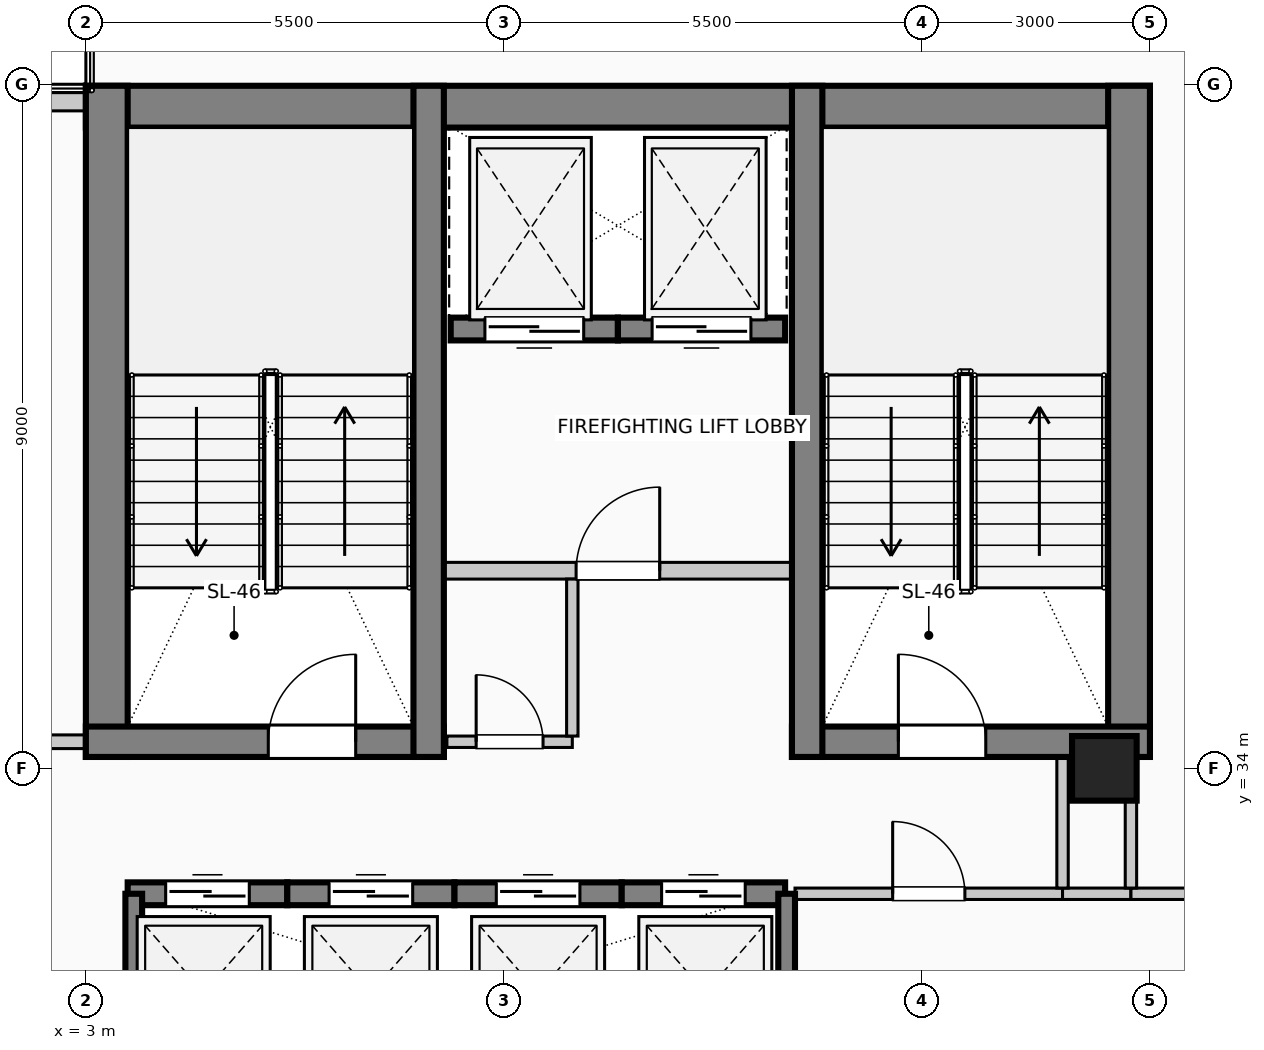
"""IFC4 building model, lengths in metres.
Left out: names, types, materials, properties, quantities, classifications, styles, units other than length and angle.
Written with IfcOpenShell. Run it as: python <this file> out.ifc"""

import sys

from ifc_helpers import new_model, si_unit, direction, frame, frame_2d, origin, origin_2d, place, context, subcontext, project, spatial, rectangle, circle, extrude, element, fill, save


model = new_model("IFC4")
c1 = context("Model", 3, precision=1e-05, world=origin(), true_north=direction((0.0, 1.0)))
c2 = subcontext(c1, "Body", "Model", "MODEL_VIEW")
j1 = project(units=[si_unit("LENGTHUNIT", "METRE"), si_unit("PLANEANGLEUNIT", "RADIAN")], contexts=[c1])
p1 = place(None, origin())
s1 = spatial("IfcSite", under=j1, at=p1, CompositionType="ELEMENT")
p2 = place(p1, origin())
s2 = spatial("IfcBuilding", under=s1, at=p2, CompositionType="ELEMENT")
p3 = place(p2, frame((0.0, 0.0, 285.0)))
s3 = spatial("IfcBuildingStorey", under=s2, at=p3, CompositionType="ELEMENT", Elevation=285.0)
p4 = place(p3, frame((3.0, 42.705, 0.0), z_axis=(0.0, 0.0, 1.0), x_axis=(1.0, 0.0, 0.0)))
e1 = element("IfcWall", 1, at=p4, inside=s3, PredefinedType="SHEAR", context=c2, shape_type="SweptSolid", body=[
    extrude(rectangle(XDim=14.0, YDim=0.55, at=frame_2d((7.0, 0.0))), origin(), (0.0, 0.0, 1.0), 4.0),
])
for number, where, z_axis, x_axis in (
    (2, (3.275, 34.15, 0.0), (0.0, 0.0, 1.0), (0.0, 1.0, 0.0)),
    (3, (16.725, 34.15, 0.0), (0.0, 0.0, 1.0), (0.0, 1.0, 0.0)),
):
    element("IfcWall", number, at=place(p3, frame(where, z_axis=z_axis, x_axis=x_axis)), inside=s3, PredefinedType="SHEAR", context=c2, shape_type="SweptSolid", body=[
        extrude(rectangle(XDim=8.83, YDim=0.55, at=frame_2d((4.415, 0.0))), origin(), (0.0, 0.0, 1.0), 4.0),
    ])
p5 = place(p3, frame((3.0, 34.35, 0.0), z_axis=(0.0, 0.0, 1.0), x_axis=(1.0, 0.0, 0.0)))
e4 = element("IfcWall", 4, at=p5, inside=s3, PredefinedType="SHEAR", context=c2, shape_type="SweptSolid", body=[
    extrude(rectangle(XDim=4.71, YDim=0.4, at=frame_2d((2.355, 0.0))), origin(), (0.0, 0.0, 1.0), 4.0),
])
p6 = place(p5, frame((2.4, 0.0, 0.0)))
e5 = element("IfcOpeningElement", 5, at=p6, cuts=e4, PredefinedType="OPENING", context=c2, shape_type="SweptSolid", body=[
    extrude(rectangle(XDim=1.15, YDim=2.2, at=frame_2d((0.575, 1.1))), frame((0.0, 0.21, 0.0), z_axis=(0.0, -1.0, 0.0), x_axis=(1.0, 0.0, 0.0)), (0.0, 0.0, 1.0), 0.42),
])
p7 = place(p3, frame((12.29, 34.35, 0.0), z_axis=(0.0, 0.0, 1.0), x_axis=(1.0, 0.0, 0.0)))
e6 = element("IfcWall", 6, at=p7, inside=s3, PredefinedType="SHEAR", context=c2, shape_type="SweptSolid", body=[
    extrude(rectangle(XDim=4.71, YDim=0.4, at=frame_2d((2.355, 0.0))), origin(), (0.0, 0.0, 1.0), 4.0),
])
p8 = place(p7, frame((1.4, 0.0, 0.0)))
e7 = element("IfcOpeningElement", 7, at=p8, cuts=e6, PredefinedType="OPENING", context=c2, shape_type="SweptSolid", body=[
    extrude(rectangle(XDim=1.15, YDim=2.2, at=frame_2d((0.575, 1.1))), frame((0.0, 0.21, 0.0), z_axis=(0.0, -1.0, 0.0), x_axis=(1.0, 0.0, 0.0)), (0.0, 0.0, 1.0), 0.42),
])
for number, where, z_axis, x_axis in (
    (8, (7.51, 34.15, 0.0), (0.0, 0.0, 1.0), (0.0, 1.0, 0.0)),
    (9, (12.49, 34.15, 0.0), (0.0, 0.0, 1.0), (0.0, 1.0, 0.0)),
):
    element("IfcWall", number, at=place(p3, frame(where, z_axis=z_axis, x_axis=x_axis)), inside=s3, PredefinedType="SHEAR", context=c2, shape_type="SweptSolid", body=[
        extrude(rectangle(XDim=8.83, YDim=0.4, at=frame_2d((4.415, 0.0))), origin(), (0.0, 0.0, 1.0), 4.0),
    ])
p9 = place(p3, frame((16.4, 34.0, 0.0), z_axis=(0.0, 0.0, 1.0), x_axis=(1.0, 0.0, 0.0)))
e10 = element("IfcColumn", 10, at=p9, inside=s3, PredefinedType="COLUMN", context=c2, shape_type="SweptSolid", body=[
    extrude(circle(Radius=0.425, at=origin_2d()), origin(), (0.0, 0.0, 1.0), 4.0),
])
p10 = place(p3, frame((0.6, 42.77, 0.0), z_axis=(0.0, 0.0, 1.0), x_axis=(1.0, 0.0, 0.0)))
e11 = element("IfcWall", 11, at=p10, inside=s3, PredefinedType="SOLIDWALL", context=c2, shape_type="SweptSolid", body=[
    extrude(rectangle(XDim=2.395, YDim=0.24, at=frame_2d((1.198, 0.0))), origin(), (0.0, 0.0, 1.0), 3.775),
])
p11 = place(p3, frame((3.55, 32.35, 0.0), z_axis=(0.0, 0.0, 1.0), x_axis=(1.0, 0.0, 0.0)))
e12 = element("IfcWall", 12, at=p11, inside=s3, PredefinedType="SOLIDWALL", context=c2, shape_type="SweptSolid", body=[
    extrude(rectangle(XDim=2.1, YDim=0.3, at=frame_2d((1.05, 0.0))), origin(), (0.0, 0.0, 1.0), 4.0),
])
p12 = place(p11, frame((0.5, 0.0, 0.0)))
e13 = element("IfcOpeningElement", 13, at=p12, cuts=e12, PredefinedType="OPENING", context=c2, shape_type="SweptSolid", body=[
    extrude(rectangle(XDim=1.1, YDim=2.2, at=frame_2d((0.55, 1.1))), frame((0.0, 0.16, 0.0), z_axis=(0.0, -1.0, 0.0), x_axis=(1.0, 0.0, 0.0)), (0.0, 0.0, 1.0), 0.32),
])
p13 = place(p3, frame((5.65, 32.35, 0.0), z_axis=(0.0, 0.0, 1.0), x_axis=(1.0, 0.0, 0.0)))
e14 = element("IfcWall", 14, at=p13, inside=s3, PredefinedType="SOLIDWALL", context=c2, shape_type="SweptSolid", body=[
    extrude(rectangle(XDim=2.2, YDim=0.3, at=frame_2d((1.1, 0.0))), origin(), (0.0, 0.0, 1.0), 4.0),
])
p14 = place(p13, frame((0.55, 0.0, 0.0)))
e15 = element("IfcOpeningElement", 15, at=p14, cuts=e14, PredefinedType="OPENING", context=c2, shape_type="SweptSolid", body=[
    extrude(rectangle(XDim=1.1, YDim=2.2, at=frame_2d((0.55, 1.1))), frame((0.0, 0.16, 0.0), z_axis=(0.0, -1.0, 0.0), x_axis=(1.0, 0.0, 0.0)), (0.0, 0.0, 1.0), 0.32),
])
p15 = place(p3, frame((7.85, 32.35, 0.0), z_axis=(0.0, 0.0, 1.0), x_axis=(1.0, 0.0, 0.0)))
e16 = element("IfcWall", 16, at=p15, inside=s3, PredefinedType="SOLIDWALL", context=c2, shape_type="SweptSolid", body=[
    extrude(rectangle(XDim=2.2, YDim=0.3, at=frame_2d((1.1, 0.0))), origin(), (0.0, 0.0, 1.0), 4.0),
])
p16 = place(p15, frame((0.55, 0.0, 0.0)))
e17 = element("IfcOpeningElement", 17, at=p16, cuts=e16, PredefinedType="OPENING", context=c2, shape_type="SweptSolid", body=[
    extrude(rectangle(XDim=1.1, YDim=2.2, at=frame_2d((0.55, 1.1))), frame((0.0, 0.16, 0.0), z_axis=(0.0, -1.0, 0.0), x_axis=(1.0, 0.0, 0.0)), (0.0, 0.0, 1.0), 0.32),
])
p17 = place(p3, frame((10.05, 32.35, 0.0), z_axis=(0.0, 0.0, 1.0), x_axis=(1.0, 0.0, 0.0)))
e18 = element("IfcWall", 18, at=p17, inside=s3, PredefinedType="SOLIDWALL", context=c2, shape_type="SweptSolid", body=[
    extrude(rectangle(XDim=2.15, YDim=0.3, at=frame_2d((1.075, 0.0))), origin(), (0.0, 0.0, 1.0), 4.0),
])
p18 = place(p17, frame((0.525, 0.0, 0.0)))
e19 = element("IfcOpeningElement", 19, at=p18, cuts=e18, PredefinedType="OPENING", context=c2, shape_type="SweptSolid", body=[
    extrude(rectangle(XDim=1.1, YDim=2.2, at=frame_2d((0.55, 1.1))), frame((0.0, 0.16, 0.0), z_axis=(0.0, -1.0, 0.0), x_axis=(1.0, 0.0, 0.0)), (0.0, 0.0, 1.0), 0.32),
])
p19 = place(p3, frame((10.0, 39.78, 0.0), z_axis=(0.0, 0.0, 1.0), x_axis=(-1.0, 0.0, 0.0)))
e20 = element("IfcWall", 20, at=p19, inside=s3, PredefinedType="SOLIDWALL", context=c2, shape_type="SweptSolid", body=[
    extrude(rectangle(XDim=2.2, YDim=0.3, at=frame_2d((1.1, 0.0))), origin(), (0.0, 0.0, 1.0), 4.0),
])
p20 = place(p19, frame((0.45, 0.0, 0.0)))
e21 = element("IfcOpeningElement", 21, at=p20, cuts=e20, PredefinedType="OPENING", context=c2, shape_type="SweptSolid", body=[
    extrude(rectangle(XDim=1.3, YDim=2.25, at=frame_2d((0.65, 1.125))), frame((0.0, 0.16, 0.0), z_axis=(0.0, -1.0, 0.0), x_axis=(1.0, 0.0, 0.0)), (0.0, 0.0, 1.0), 0.32),
])
p21 = place(p3, frame((12.2, 39.78, 0.0), z_axis=(0.0, 0.0, 1.0), x_axis=(-1.0, 0.0, 0.0)))
e22 = element("IfcWall", 22, at=p21, inside=s3, PredefinedType="SOLIDWALL", context=c2, shape_type="SweptSolid", body=[
    extrude(rectangle(XDim=2.2, YDim=0.3, at=frame_2d((1.1, 0.0))), origin(), (0.0, 0.0, 1.0), 4.0),
])
p22 = place(p21, frame((0.45, 0.0, 0.0)))
e23 = element("IfcOpeningElement", 23, at=p22, cuts=e22, PredefinedType="OPENING", context=c2, shape_type="SweptSolid", body=[
    extrude(rectangle(XDim=1.3, YDim=2.25, at=frame_2d((0.65, 1.125))), frame((0.0, 0.16, 0.0), z_axis=(0.0, -1.0, 0.0), x_axis=(1.0, 0.0, 0.0)), (0.0, 0.0, 1.0), 0.32),
])
p23 = place(p3, frame((3.63, 26.8, 0.0), z_axis=(0.0, 0.0, 1.0), x_axis=(0.0, 1.0, 0.0)))
e24 = element("IfcWall", 24, at=p23, inside=s3, PredefinedType="SOLIDWALL", context=c2, shape_type="SweptSolid", body=[
    extrude(rectangle(XDim=5.55, YDim=0.22, at=frame_2d((2.775, 0.0))), origin(), (0.0, 0.0, 1.0), 4.0),
])
p24 = place(p3, frame((12.22, 29.75, 0.0), z_axis=(0.0, 0.0, 1.0), x_axis=(0.0, 1.0, 0.0)))
e25 = element("IfcWall", 25, at=p24, inside=s3, PredefinedType="SOLIDWALL", context=c2, shape_type="SweptSolid", body=[
    extrude(rectangle(XDim=2.6, YDim=0.22, at=frame_2d((1.3, 0.0))), origin(), (0.0, 0.0, 1.0), 4.0),
])
p25 = place(p3, frame((7.51, 36.6, 0.0), z_axis=(0.0, 0.0, 1.0), x_axis=(1.0, 0.0, 0.0)))
e26 = element("IfcWall", 26, at=p25, inside=s3, PredefinedType="PARTITIONING", context=c2, shape_type="SweptSolid", body=[
    extrude(rectangle(XDim=4.98, YDim=0.22, at=frame_2d((2.49, 0.0))), origin(), (0.0, 0.0, 1.0), 3.775),
])
p26 = place(p25, frame((1.94, 0.0, 0.0)))
e27 = element("IfcOpeningElement", 27, at=p26, cuts=e26, PredefinedType="OPENING", context=c2, shape_type="SweptSolid", body=[
    extrude(rectangle(XDim=1.1, YDim=2.2, at=frame_2d((0.55, 1.1))), frame((0.0, 0.12, 0.0), z_axis=(0.0, -1.0, 0.0), x_axis=(1.0, 0.0, 0.0)), (0.0, 0.0, 1.0), 0.24),
])
p27 = place(p3, frame((12.33, 32.35, 0.0), z_axis=(0.0, 0.0, 1.0), x_axis=(1.0, 0.0, 0.0)))
e28 = element("IfcWall", 28, at=p27, inside=s3, PredefinedType="PARTITIONING", context=c2, shape_type="SweptSolid", body=[
    extrude(rectangle(XDim=3.52, YDim=0.15, at=frame_2d((1.76, 0.0))), origin(), (0.0, 0.0, 1.0), 3.775),
])
p28 = place(p27, frame((1.285, 0.0, 0.0)))
e29 = element("IfcOpeningElement", 29, at=p28, cuts=e28, PredefinedType="OPENING", context=c2, shape_type="SweptSolid", body=[
    extrude(rectangle(XDim=0.95, YDim=2.15, at=frame_2d((0.475, 1.075))), frame((0.0, 0.085, 0.0), z_axis=(0.0, -1.0, 0.0), x_axis=(1.0, 0.0, 0.0)), (0.0, 0.0, 1.0), 0.17),
])
p29 = place(p3, frame((15.85, 32.35, 0.0), z_axis=(0.0, 0.0, 1.0), x_axis=(1.0, 0.0, 0.0)))
e30 = element("IfcWall", 30, at=p29, inside=s3, PredefinedType="PARTITIONING", context=c2, shape_type="SweptSolid", body=[
    extrude(rectangle(XDim=0.9, YDim=0.15, at=frame_2d((0.45, 0.0))), origin(), (0.0, 0.0, 1.0), 3.775),
])
p30 = place(p3, frame((16.75, 32.35, 0.0), z_axis=(0.0, 0.0, 1.0), x_axis=(1.0, 0.0, 0.0)))
e31 = element("IfcWall", 31, at=p30, inside=s3, PredefinedType="PARTITIONING", context=c2, shape_type="SweptSolid", body=[
    extrude(rectangle(XDim=4.25, YDim=0.15, at=frame_2d((2.125, 0.0))), origin(), (0.0, 0.0, 1.0), 3.775),
])
p31 = place(p3, frame((1.075, 34.35, 0.0), z_axis=(0.0, 0.0, 1.0), x_axis=(1.0, 0.0, 0.0)))
e32 = element("IfcWall", 32, at=p31, inside=s3, PredefinedType="PARTITIONING", context=c2, shape_type="SweptSolid", body=[
    extrude(rectangle(XDim=1.925, YDim=0.18, at=frame_2d((0.962, 0.0))), origin(), (0.0, 0.0, 1.0), 3.775),
])
p32 = place(p3, frame((7.75, 34.35, 0.0), z_axis=(0.0, 0.0, 1.0), x_axis=(1.0, 0.0, 0.0)))
e33 = element("IfcWall", 33, at=p32, inside=s3, PredefinedType="PARTITIONING", context=c2, shape_type="SweptSolid", body=[
    extrude(rectangle(XDim=1.65, YDim=0.15, at=frame_2d((0.825, 0.0))), origin(), (0.0, 0.0, 1.0), 3.775),
])
p33 = place(p32, frame((0.385, 0.0, 0.0)))
e34 = element("IfcOpeningElement", 34, at=p33, cuts=e33, PredefinedType="OPENING", context=c2, shape_type="SweptSolid", body=[
    extrude(rectangle(XDim=0.88, YDim=2.1, at=frame_2d((0.44, 1.05))), frame((0.0, 0.085, 0.0), z_axis=(0.0, -1.0, 0.0), x_axis=(1.0, 0.0, 0.0)), (0.0, 0.0, 1.0), 0.17),
])
p34 = place(p3, frame((9.4, 34.425, 0.0), z_axis=(0.0, 0.0, 1.0), x_axis=(0.0, 1.0, 0.0)))
e35 = element("IfcWall", 35, at=p34, inside=s3, PredefinedType="PARTITIONING", context=c2, shape_type="SweptSolid", body=[
    extrude(rectangle(XDim=2.065, YDim=0.15, at=frame_2d((1.032, 0.0))), origin(), (0.0, 0.0, 1.0), 3.775),
])
p35 = place(p3, frame((15.85, 32.425, 0.0), z_axis=(0.0, 0.0, 1.0), x_axis=(0.0, 1.0, 0.0)))
e36 = element("IfcWall", 36, at=p35, inside=s3, PredefinedType="PARTITIONING", context=c2, shape_type="SweptSolid", body=[
    extrude(rectangle(XDim=1.725, YDim=0.15, at=frame_2d((0.862, 0.0))), origin(), (0.0, 0.0, 1.0), 3.775),
])
p36 = place(p3, frame((16.75, 32.425, 0.0), z_axis=(0.0, 0.0, 1.0), x_axis=(0.0, 1.0, 0.0)))
e37 = element("IfcWall", 37, at=p36, inside=s3, PredefinedType="PARTITIONING", context=c2, shape_type="SweptSolid", body=[
    extrude(rectangle(XDim=1.15, YDim=0.15, at=frame_2d((0.575, 0.0))), origin(), (0.0, 0.0, 1.0), 3.775),
])
p37 = place(p12, origin())
e38 = element("IfcDoor", 38, at=p37, inside=s3, OperationType="SLIDING_TO_LEFT", PredefinedType="DOOR", context=c2, shape_type="SweptSolid", body=[
    extrude(rectangle(XDim=1.1, YDim=2.2, at=frame_2d((0.55, 1.1))), frame((0.0, 0.025, 0.0), z_axis=(0.0, -1.0, 0.0), x_axis=(1.0, 0.0, 0.0)), (0.0, 0.0, 1.0), 0.05),
])
fill(e13, e38)
p38 = place(p14, origin())
e39 = element("IfcDoor", 39, at=p38, inside=s3, OperationType="SLIDING_TO_RIGHT", PredefinedType="DOOR", context=c2, shape_type="SweptSolid", body=[
    extrude(rectangle(XDim=1.1, YDim=2.2, at=frame_2d((0.55, 1.1))), frame((0.0, 0.025, 0.0), z_axis=(0.0, -1.0, 0.0), x_axis=(1.0, 0.0, 0.0)), (0.0, 0.0, 1.0), 0.05),
])
fill(e15, e39)
p39 = place(p16, origin())
e40 = element("IfcDoor", 40, at=p39, inside=s3, OperationType="SLIDING_TO_LEFT", PredefinedType="DOOR", context=c2, shape_type="SweptSolid", body=[
    extrude(rectangle(XDim=1.1, YDim=2.2, at=frame_2d((0.55, 1.1))), frame((0.0, 0.025, 0.0), z_axis=(0.0, -1.0, 0.0), x_axis=(1.0, 0.0, 0.0)), (0.0, 0.0, 1.0), 0.05),
])
fill(e17, e40)
p40 = place(p18, origin())
e41 = element("IfcDoor", 41, at=p40, inside=s3, OperationType="SLIDING_TO_RIGHT", PredefinedType="DOOR", context=c2, shape_type="SweptSolid", body=[
    extrude(rectangle(XDim=1.1, YDim=2.2, at=frame_2d((0.55, 1.1))), frame((0.0, 0.025, 0.0), z_axis=(0.0, -1.0, 0.0), x_axis=(1.0, 0.0, 0.0)), (0.0, 0.0, 1.0), 0.05),
])
fill(e19, e41)
p41 = place(p20, origin())
e42 = element("IfcDoor", 42, at=p41, inside=s3, OperationType="SLIDING_TO_LEFT", PredefinedType="DOOR", context=c2, shape_type="SweptSolid", body=[
    extrude(rectangle(XDim=1.3, YDim=2.25, at=frame_2d((0.65, 1.125))), frame((0.0, 0.025, 0.0), z_axis=(0.0, -1.0, 0.0), x_axis=(1.0, 0.0, 0.0)), (0.0, 0.0, 1.0), 0.05),
])
fill(e21, e42)
p42 = place(p22, origin())
e43 = element("IfcDoor", 43, at=p42, inside=s3, OperationType="SLIDING_TO_RIGHT", PredefinedType="DOOR", context=c2, shape_type="SweptSolid", body=[
    extrude(rectangle(XDim=1.3, YDim=2.25, at=frame_2d((0.65, 1.125))), frame((0.0, 0.025, 0.0), z_axis=(0.0, -1.0, 0.0), x_axis=(1.0, 0.0, 0.0)), (0.0, 0.0, 1.0), 0.05),
])
fill(e23, e43)
p43 = place(p6, origin())
e44 = element("IfcDoor", 44, at=p43, inside=s3, OperationType="SINGLE_SWING_RIGHT", PredefinedType="DOOR", context=c2, shape_type="SweptSolid", body=[
    extrude(rectangle(XDim=1.15, YDim=2.2, at=frame_2d((0.575, 1.1))), frame((0.0, 0.025, 0.0), z_axis=(0.0, -1.0, 0.0), x_axis=(1.0, 0.0, 0.0)), (0.0, 0.0, 1.0), 0.05),
])
fill(e5, e44)
p44 = place(p8, origin())
e45 = element("IfcDoor", 45, at=p44, inside=s3, OperationType="SINGLE_SWING_LEFT", PredefinedType="DOOR", context=c2, shape_type="SweptSolid", body=[
    extrude(rectangle(XDim=1.15, YDim=2.2, at=frame_2d((0.575, 1.1))), frame((0.0, 0.025, 0.0), z_axis=(0.0, -1.0, 0.0), x_axis=(1.0, 0.0, 0.0)), (0.0, 0.0, 1.0), 0.05),
])
fill(e7, e45)
p45 = place(p26, origin())
e46 = element("IfcDoor", 46, at=p45, inside=s3, OperationType="SINGLE_SWING_RIGHT", PredefinedType="DOOR", context=c2, shape_type="SweptSolid", body=[
    extrude(rectangle(XDim=1.1, YDim=2.2, at=frame_2d((0.55, 1.1))), frame((0.0, 0.025, 0.0), z_axis=(0.0, -1.0, 0.0), x_axis=(1.0, 0.0, 0.0)), (0.0, 0.0, 1.0), 0.05),
])
fill(e27, e46)
p46 = place(p28, origin())
e47 = element("IfcDoor", 47, at=p46, inside=s3, OperationType="SINGLE_SWING_LEFT", PredefinedType="DOOR", context=c2, shape_type="SweptSolid", body=[
    extrude(rectangle(XDim=0.95, YDim=2.15, at=frame_2d((0.475, 1.075))), frame((0.0, 0.025, 0.0), z_axis=(0.0, -1.0, 0.0), x_axis=(1.0, 0.0, 0.0)), (0.0, 0.0, 1.0), 0.05),
])
fill(e29, e47)
p47 = place(p33, origin())
e48 = element("IfcDoor", 48, at=p47, inside=s3, OperationType="SINGLE_SWING_LEFT", PredefinedType="DOOR", context=c2, shape_type="SweptSolid", body=[
    extrude(rectangle(XDim=0.88, YDim=2.1, at=frame_2d((0.44, 1.05))), frame((0.0, 0.025, 0.0), z_axis=(0.0, -1.0, 0.0), x_axis=(1.0, 0.0, 0.0)), (0.0, 0.0, 1.0), 0.05),
])
fill(e34, e48)
save(model, sys.argv[1])
